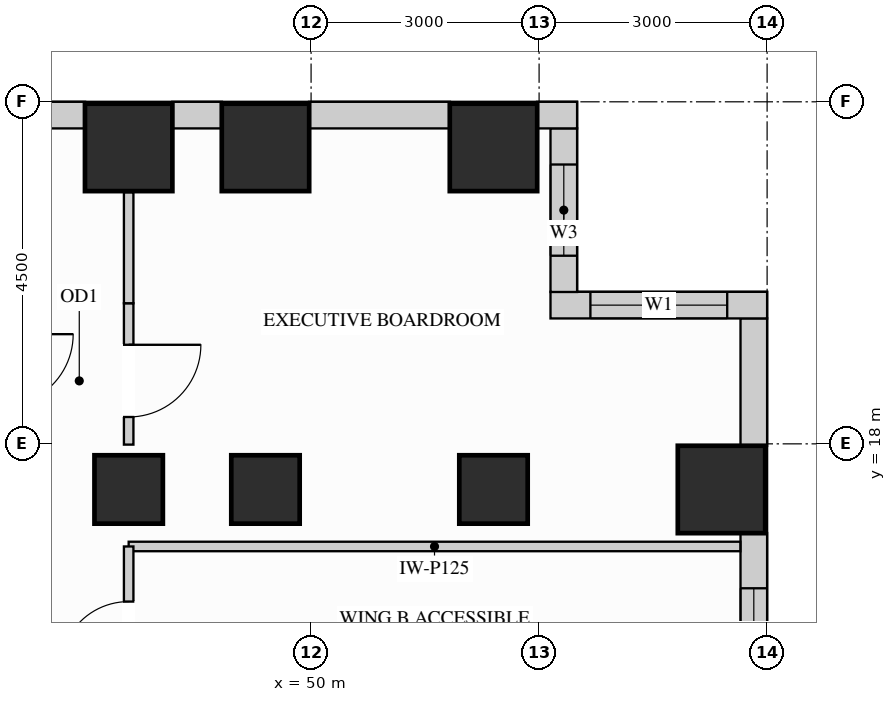
"""IFC4 building model, lengths in metres.
Left out: names, types, materials, properties, quantities, classifications, styles, units other than length and angle.
Written with IfcOpenShell. Run it as: python <this file> out.ifc"""

import sys

from ifc_helpers import new_model, si_unit, direction, frame, frame_2d, origin, origin_2d, place, context, subcontext, project, spatial, rectangle, extrude, source, transform, mapped, element, fill, save


model = new_model("IFC4")
c1 = context("Model", 3, precision=1e-05, world=origin(), true_north=direction((0.0, 1.0)))
c2 = subcontext(c1, "Body", "Model", "MODEL_VIEW")
j1 = project(units=[si_unit("LENGTHUNIT", "METRE"), si_unit("PLANEANGLEUNIT", "RADIAN")], contexts=[c1])
p1 = place(None, origin())
s1 = spatial("IfcSite", under=j1, at=p1, CompositionType="ELEMENT")
p2 = place(p1, origin())
s2 = spatial("IfcBuilding", under=s1, at=p2, CompositionType="ELEMENT")
p3 = place(p2, frame((0.0, 0.0, 88.2)))
s3 = spatial("IfcBuildingStorey", under=s2, at=p3, CompositionType="ELEMENT", Elevation=88.2)
m1 = source(origin(), c2, "Body", "SweptSolid", [
    extrude(rectangle(XDim=0.9, YDim=0.9, at=origin_2d()), origin(), (0.0, 0.0, 1.0), 3.38),
])
for number, where, z_axis, x_axis in (
    (1, (47.6, 17.4, 0.0), (0.0, 0.0, 1.0), (1.0, 0.0, 0.0)),
    (2, (49.4, 17.4, 0.0), (0.0, 0.0, 1.0), (1.0, 0.0, 0.0)),
    (3, (52.4, 17.4, 0.0), (0.0, 0.0, 1.0), (1.0, 0.0, 0.0)),
):
    element("IfcColumn", number, at=place(p3, frame(where, z_axis=z_axis, x_axis=x_axis)), inside=s3, PredefinedType="COLUMN", context=c2, shape_type="MappedRepresentation", body=[
        mapped(m1, transform((0.0, 0.0, 0.0), x_axis=(1.0, 0.0, 0.0), y_axis=(0.0, 1.0, 0.0), z_axis=(0.0, 0.0, 1.0))),
    ])
m2 = source(origin(), c2, "Body", "SweptSolid", [
    extrude(rectangle(XDim=1.15, YDim=1.15, at=origin_2d()), origin(), (0.0, 0.0, 1.0), 3.38),
])
for number, where, z_axis, x_axis in (
    (4, (47.6, 21.9, 0.0), (0.0, 0.0, 1.0), (1.0, 0.0, 0.0)),
    (5, (49.4, 21.9, 0.0), (0.0, 0.0, 1.0), (1.0, 0.0, 0.0)),
    (6, (52.4, 21.9, 0.0), (0.0, 0.0, 1.0), (1.0, 0.0, 0.0)),
    (7, (55.4, 17.4, 0.0), (0.0, 0.0, 1.0), (1.0, 0.0, 0.0)),
):
    element("IfcColumn", number, at=place(p3, frame(where, z_axis=z_axis, x_axis=x_axis)), inside=s3, PredefinedType="COLUMN", context=c2, shape_type="MappedRepresentation", body=[
        mapped(m2, transform((0.0, 0.0, 0.0), x_axis=(1.0, 0.0, 0.0), y_axis=(0.0, 1.0, 0.0), z_axis=(0.0, 0.0, 1.0))),
    ])
p4 = place(p3, frame((55.825, 14.073, 0.0), z_axis=(0.0, 0.0, 1.0), x_axis=(0.0, 1.0, 0.0)))
e8 = element("IfcWall", 8, at=p4, inside=s3, PredefinedType="SOLIDWALL", context=c2, shape_type="SweptSolid", body=[
    extrude(rectangle(XDim=2.754, YDim=0.35, at=frame_2d((1.377, 0.0))), origin(), (0.0, 0.0, 1.0), 3.365),
])
p5 = place(p4, frame((0.827, 0.0, 0.78)))
e9 = element("IfcOpeningElement", 9, at=p5, cuts=e8, PredefinedType="OPENING", context=c2, shape_type="SweptSolid", body=[
    extrude(rectangle(XDim=1.2, YDim=2.1, at=frame_2d((0.6, 1.05))), frame((0.0, 0.185, 0.0), z_axis=(0.0, -1.0, 0.0), x_axis=(1.0, 0.0, 0.0)), (0.0, 0.0, 1.0), 0.37),
])
m3 = source(origin(), c2, "Body", "SweptSolid", [
    extrude(rectangle(XDim=1.679, YDim=0.35, at=frame_2d((0.84, 0.0))), origin(), (0.0, 0.0, 1.0), 3.365),
])
p6 = place(p3, frame((55.825, 17.973, 0.0), z_axis=(0.0, 0.0, 1.0), x_axis=(0.0, 1.0, 0.0)))
e10 = element("IfcWall", 10, at=p6, inside=s3, PredefinedType="SOLIDWALL", context=c2, shape_type="MappedRepresentation", body=[
    mapped(m3, transform((0.0, 0.0, 0.0), x_axis=(1.0, 0.0, 0.0), y_axis=(0.0, 1.0, 0.0), z_axis=(0.0, 0.0, 1.0))),
])
p7 = place(p3, frame((56.0, 19.825, 0.0), z_axis=(0.0, 0.0, 1.0), x_axis=(-1.0, 0.0, 0.0)))
e11 = element("IfcWall", 11, at=p7, inside=s3, PredefinedType="SOLIDWALL", context=c2, shape_type="SweptSolid", body=[
    extrude(rectangle(XDim=2.85, YDim=0.35, at=frame_2d((1.425, 0.0))), origin(), (0.0, 0.0, 1.0), 3.365),
])
p8 = place(p7, frame((0.525, 0.0, 0.78)))
e12 = element("IfcOpeningElement", 12, at=p8, cuts=e11, PredefinedType="OPENING", context=c2, shape_type="SweptSolid", body=[
    extrude(rectangle(XDim=1.8, YDim=2.1, at=frame_2d((0.9, 1.05))), frame((0.0, 0.185, 0.0), z_axis=(0.0, -1.0, 0.0), x_axis=(1.0, 0.0, 0.0)), (0.0, 0.0, 1.0), 0.37),
])
p9 = place(p3, frame((53.325, 19.998, 0.0), z_axis=(0.0, 0.0, 1.0), x_axis=(0.0, 1.0, 0.0)))
e13 = element("IfcWall", 13, at=p9, inside=s3, PredefinedType="SOLIDWALL", context=c2, shape_type="SweptSolid", body=[
    extrude(rectangle(XDim=2.154, YDim=0.35, at=frame_2d((1.077, 0.0))), origin(), (0.0, 0.0, 1.0), 3.365),
])
p10 = place(p9, frame((0.477, 0.0, 0.78)))
e14 = element("IfcOpeningElement", 14, at=p10, cuts=e13, PredefinedType="OPENING", context=c2, shape_type="SweptSolid", body=[
    extrude(rectangle(XDim=1.2, YDim=2.1, at=frame_2d((0.6, 1.05))), frame((0.0, 0.185, 0.0), z_axis=(0.0, -1.0, 0.0), x_axis=(1.0, 0.0, 0.0)), (0.0, 0.0, 1.0), 0.37),
])
m4 = source(origin(), c2, "Body", "SweptSolid", [
    extrude(rectangle(XDim=0.527, YDim=0.35, at=frame_2d((0.264, 0.0))), origin(), (0.0, 0.0, 1.0), 3.365),
])
p11 = place(p3, frame((53.5, 22.325, 0.0), z_axis=(0.0, 0.0, 1.0), x_axis=(-1.0, 0.0, 0.0)))
e15 = element("IfcWall", 15, at=p11, inside=s3, PredefinedType="SOLIDWALL", context=c2, shape_type="MappedRepresentation", body=[
    mapped(m4, transform((0.0, 0.0, 0.0), x_axis=(1.0, 0.0, 0.0), y_axis=(0.0, 1.0, 0.0), z_axis=(0.0, 0.0, 1.0))),
])
m5 = source(origin(), c2, "Body", "SweptSolid", [
    extrude(rectangle(XDim=1.854, YDim=0.35, at=frame_2d((0.927, 0.0))), origin(), (0.0, 0.0, 1.0), 3.365),
])
p12 = place(p3, frame((51.827, 22.325, 0.0), z_axis=(0.0, 0.0, 1.0), x_axis=(-1.0, 0.0, 0.0)))
e16 = element("IfcWall", 16, at=p12, inside=s3, PredefinedType="SOLIDWALL", context=c2, shape_type="MappedRepresentation", body=[
    mapped(m5, transform((0.0, 0.0, 0.0), x_axis=(1.0, 0.0, 0.0), y_axis=(0.0, 1.0, 0.0), z_axis=(0.0, 0.0, 1.0))),
])
m6 = source(origin(), c2, "Body", "SweptSolid", [
    extrude(rectangle(XDim=0.654, YDim=0.35, at=frame_2d((0.327, 0.0))), origin(), (0.0, 0.0, 1.0), 3.365),
])
p13 = place(p3, frame((48.827, 22.325, 0.0), z_axis=(0.0, 0.0, 1.0), x_axis=(-1.0, 0.0, 0.0)))
e17 = element("IfcWall", 17, at=p13, inside=s3, PredefinedType="SOLIDWALL", context=c2, shape_type="MappedRepresentation", body=[
    mapped(m6, transform((0.0, 0.0, 0.0), x_axis=(1.0, 0.0, 0.0), y_axis=(0.0, 1.0, 0.0), z_axis=(0.0, 0.0, 1.0))),
])
p14 = place(p3, frame((47.027, 22.325, 0.0), z_axis=(0.0, 0.0, 1.0), x_axis=(-1.0, 0.0, 0.0)))
e18 = element("IfcWall", 18, at=p14, inside=s3, PredefinedType="SOLIDWALL", context=c2, shape_type="SweptSolid", body=[
    extrude(rectangle(XDim=6.454, YDim=0.35, at=frame_2d((3.227, 0.0))), origin(), (0.0, 0.0, 1.0), 3.365),
])
p15 = place(p14, frame((1.749, 0.0, 0.78)))
e19 = element("IfcOpeningElement", 19, at=p15, cuts=e18, PredefinedType="OPENING", context=c2, shape_type="SweptSolid", body=[
    extrude(rectangle(XDim=1.8, YDim=2.1, at=frame_2d((0.9, 1.05))), frame((0.0, 0.185, 0.0), z_axis=(0.0, -1.0, 0.0), x_axis=(1.0, 0.0, 0.0)), (0.0, 0.0, 1.0), 0.37),
])
p16 = place(p14, frame((3.942, 0.0, 0.78)))
e20 = element("IfcOpeningElement", 20, at=p16, cuts=e18, PredefinedType="OPENING", context=c2, shape_type="SweptSolid", body=[
    extrude(rectangle(XDim=1.8, YDim=2.1, at=frame_2d((0.9, 1.05))), frame((0.0, 0.185, 0.0), z_axis=(0.0, -1.0, 0.0), x_axis=(1.0, 0.0, 0.0)), (0.0, 0.0, 1.0), 0.37),
])
m7 = source(origin(), c2, "Body", "SweptSolid", [
    extrude(rectangle(XDim=8.048, YDim=0.125, at=frame_2d((4.024, 0.0))), origin(), (0.0, 0.0, 1.0), 2.677),
])
p17 = place(p3, frame((47.6, 16.65, 0.0), z_axis=(0.0, 0.0, 1.0), x_axis=(1.0, 0.0, 0.0)))
e21 = element("IfcWall", 21, at=p17, inside=s3, PredefinedType="PARTITIONING", context=c2, shape_type="MappedRepresentation", body=[
    mapped(m7, transform((0.0, 0.0, 0.0), x_axis=(1.0, 0.0, 0.0), y_axis=(0.0, 1.0, 0.0), z_axis=(0.0, 0.0, 1.0))),
])
p18 = place(p3, frame((47.6, 17.99, 0.0), z_axis=(0.0, 0.0, 1.0), x_axis=(0.0, 1.0, 0.0)))
e22 = element("IfcWall", 22, at=p18, inside=s3, PredefinedType="PARTITIONING", context=c2, shape_type="SweptSolid", body=[
    extrude(rectangle(XDim=1.86, YDim=0.125, at=frame_2d((0.93, 0.0))), origin(), (0.0, 0.0, 1.0), 2.677),
])
p19 = place(p18, frame((0.363, 0.0, 0.0)))
e23 = element("IfcOpeningElement", 23, at=p19, cuts=e22, PredefinedType="OPENING", context=c2, shape_type="SweptSolid", body=[
    extrude(rectangle(XDim=0.95, YDim=2.15, at=frame_2d((0.475, 1.075))), frame((0.0, 0.073, 0.0), z_axis=(0.0, -1.0, 0.0), x_axis=(1.0, 0.0, 0.0)), (0.0, 0.0, 1.0), 0.145),
])
m8 = source(origin(), c2, "Body", "SweptSolid", [
    extrude(rectangle(XDim=1.46, YDim=0.125, at=frame_2d((0.73, 0.0))), origin(), (0.0, 0.0, 1.0), 2.677),
])
p20 = place(p3, frame((47.6, 19.85, 0.0), z_axis=(0.0, 0.0, 1.0), x_axis=(0.0, 1.0, 0.0)))
e24 = element("IfcWall", 24, at=p20, inside=s3, PredefinedType="PARTITIONING", context=c2, shape_type="MappedRepresentation", body=[
    mapped(m8, transform((0.0, 0.0, 0.0), x_axis=(1.0, 0.0, 0.0), y_axis=(0.0, 1.0, 0.0), z_axis=(0.0, 0.0, 1.0))),
])
p21 = place(p3, frame((47.6, 14.35, 0.0), z_axis=(0.0, 0.0, 1.0), x_axis=(0.0, 1.0, 0.0)))
e25 = element("IfcWall", 25, at=p21, inside=s3, PredefinedType="PARTITIONING", context=c2, shape_type="SweptSolid", body=[
    extrude(rectangle(XDim=2.3, YDim=0.125, at=frame_2d((1.15, 0.0))), origin(), (0.0, 0.0, 1.0), 2.677),
])
p22 = place(p21, frame((0.675, 0.0, 0.0)))
e26 = element("IfcOpeningElement", 26, at=p22, cuts=e25, PredefinedType="OPENING", context=c2, shape_type="SweptSolid", body=[
    extrude(rectangle(XDim=0.9, YDim=2.15, at=frame_2d((0.45, 1.075))), frame((0.0, 0.073, 0.0), z_axis=(0.0, -1.0, 0.0), x_axis=(1.0, 0.0, 0.0)), (0.0, 0.0, 1.0), 0.145),
])
m9 = source(origin(), c2, "Body", "SweptSolid", [
    extrude(rectangle(XDim=0.95, YDim=2.15, at=frame_2d((0.475, 1.075))), frame((0.0, 0.025, 0.0), z_axis=(0.0, -1.0, 0.0), x_axis=(1.0, 0.0, 0.0)), (0.0, 0.0, 1.0), 0.05),
])
p23 = place(p19, origin())
e27 = element("IfcDoor", 27, at=p23, inside=s3, OperationType="SINGLE_SWING_RIGHT", PredefinedType="DOOR", context=c2, shape_type="MappedRepresentation", body=[
    mapped(m9, transform((0.0, 0.0, 0.0), x_axis=(1.0, 0.0, 0.0), y_axis=(0.0, 1.0, 0.0), z_axis=(0.0, 0.0, 1.0))),
])
fill(e23, e27)
m10 = source(origin(), c2, "Body", "SweptSolid", [
    extrude(rectangle(XDim=0.9, YDim=2.15, at=frame_2d((0.45, 1.075))), frame((0.0, 0.025, 0.0), z_axis=(0.0, -1.0, 0.0), x_axis=(1.0, 0.0, 0.0)), (0.0, 0.0, 1.0), 0.05),
])
p24 = place(p22, origin())
e28 = element("IfcDoor", 28, at=p24, inside=s3, OperationType="SINGLE_SWING_LEFT", PredefinedType="DOOR", context=c2, shape_type="MappedRepresentation", body=[
    mapped(m10, transform((0.0, 0.0, 0.0), x_axis=(1.0, 0.0, 0.0), y_axis=(0.0, 1.0, 0.0), z_axis=(0.0, 0.0, 1.0))),
])
fill(e26, e28)
m11 = source(origin(), c2, "Body", "SweptSolid", [
    extrude(rectangle(XDim=1.8, YDim=2.1, at=frame_2d((0.9, 1.05))), frame((0.0, 0.03, 0.0), z_axis=(0.0, -1.0, 0.0), x_axis=(1.0, 0.0, 0.0)), (0.0, 0.0, 1.0), 0.06),
])
p25 = place(p8, origin())
e29 = element("IfcWindow", 29, at=p25, inside=s3, PartitioningType="SINGLE_PANEL", PredefinedType="WINDOW", context=c2, shape_type="MappedRepresentation", body=[
    mapped(m11, transform((0.0, 0.0, 0.0), x_axis=(1.0, 0.0, 0.0), y_axis=(0.0, 1.0, 0.0), z_axis=(0.0, 0.0, 1.0))),
])
fill(e12, e29)
m12 = source(origin(), c2, "Body", "SweptSolid", [
    extrude(rectangle(XDim=1.2, YDim=2.1, at=frame_2d((0.6, 1.05))), frame((0.0, 0.03, 0.0), z_axis=(0.0, -1.0, 0.0), x_axis=(1.0, 0.0, 0.0)), (0.0, 0.0, 1.0), 0.06),
])
p26 = place(p5, origin())
e30 = element("IfcWindow", 30, at=p26, inside=s3, PartitioningType="SINGLE_PANEL", PredefinedType="WINDOW", context=c2, shape_type="MappedRepresentation", body=[
    mapped(m12, transform((0.0, 0.0, 0.0), x_axis=(1.0, 0.0, 0.0), y_axis=(0.0, 1.0, 0.0), z_axis=(0.0, 0.0, 1.0))),
])
fill(e9, e30)
p27 = place(p10, origin())
e31 = element("IfcWindow", 31, at=p27, inside=s3, PartitioningType="SINGLE_PANEL", PredefinedType="WINDOW", context=c2, shape_type="MappedRepresentation", body=[
    mapped(m12, transform((0.0, 0.0, 0.0), x_axis=(1.0, 0.0, 0.0), y_axis=(0.0, 1.0, 0.0), z_axis=(0.0, 0.0, 1.0))),
])
fill(e14, e31)
save(model, sys.argv[1])
